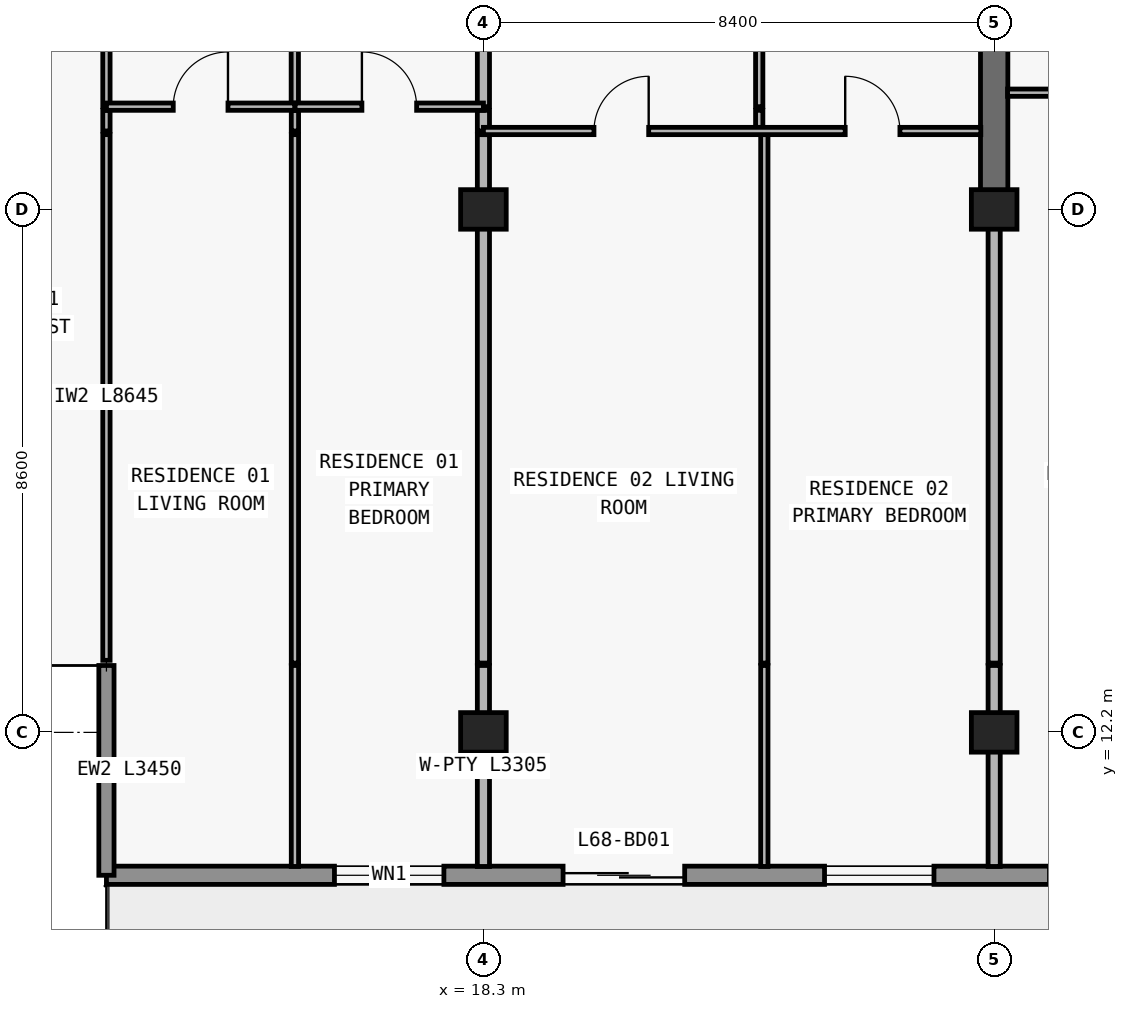
"""IFC4 building model, lengths in metres.
Left out: names, types, materials, properties, quantities, classifications, styles, units other than length and angle.
Written with IfcOpenShell. Run it as: python <this file> out.ifc"""

import sys

from ifc_helpers import new_model, si_unit, direction, frame, frame_2d, origin, origin_2d, place, context, subcontext, project, spatial, rectangle, extrude, element, fill, save


model = new_model("IFC4")
c1 = context("Model", 3, precision=1e-05, world=origin(), true_north=direction((0.0, 1.0)))
c2 = subcontext(c1, "Body", "Model", "MODEL_VIEW")
j1 = project(units=[si_unit("LENGTHUNIT", "METRE"), si_unit("PLANEANGLEUNIT", "RADIAN")], contexts=[c1])
p1 = place(None, origin())
s1 = spatial("IfcSite", under=j1, at=p1, CompositionType="ELEMENT")
p2 = place(p1, origin())
s2 = spatial("IfcBuilding", under=s1, at=p2, CompositionType="ELEMENT")
p3 = place(p2, frame((0.0, 0.0, 243.0)))
s3 = spatial("IfcBuildingStorey", under=s2, at=p3, CompositionType="ELEMENT", Elevation=243.0)
for number, where, z_axis, x_axis in (
    (1, (18.3, 12.2, 0.0), (0.0, 0.0, 1.0), (1.0, 0.0, 0.0)),
    (2, (26.7, 12.2, 0.0), (0.0, 0.0, 1.0), (1.0, 0.0, 0.0)),
    (3, (18.3, 20.8, 0.0), (0.0, 0.0, 1.0), (1.0, 0.0, 0.0)),
    (4, (26.7, 20.8, 0.0), (0.0, 0.0, 1.0), (1.0, 0.0, 0.0)),
):
    element("IfcColumn", number, at=place(p3, frame(where, z_axis=z_axis, x_axis=x_axis)), inside=s3, PredefinedType="COLUMN", context=c2, shape_type="SweptSolid", body=[
        extrude(rectangle(XDim=0.75, YDim=0.65, at=origin_2d()), origin(), (0.0, 0.0, 1.0), 3.05),
    ])
p4 = place(p3, frame((26.7, 20.8, 0.0), z_axis=(0.0, 0.0, 1.0), x_axis=(0.0, 1.0, 0.0)))
e5 = element("IfcWall", 5, at=p4, inside=s3, PredefinedType="SHEAR", context=c2, shape_type="SweptSolid", body=[
    extrude(rectangle(XDim=8.6, YDim=0.45, at=frame_2d((4.3, 0.0))), origin(), (0.0, 0.0, 1.0), 3.05),
])
p5 = place(p3, frame((65.7, 9.85, 0.0), z_axis=(0.0, 0.0, 1.0), x_axis=(-1.0, 0.0, 0.0)))
e6 = element("IfcWall", 6, at=p5, inside=s3, PredefinedType="STANDARD", context=c2, shape_type="SweptSolid", body=[
    extrude(rectangle(XDim=53.6, YDim=0.3, at=frame_2d((26.8, 0.0))), origin(), (0.0, 0.0, 1.0), 3.05),
])
p6 = place(p5, frame((48.05, 0.0, 0.85)))
e7 = element("IfcOpeningElement", 7, at=p6, cuts=e6, PredefinedType="OPENING", context=c2, shape_type="SweptSolid", body=[
    extrude(rectangle(XDim=1.8, YDim=1.55, at=frame_2d((0.9, 0.775))), frame((0.0, 0.16, 0.0), z_axis=(0.0, -1.0, 0.0), x_axis=(1.0, 0.0, 0.0)), (0.0, 0.0, 1.0), 0.32),
])
p7 = place(p5, frame((44.09, 0.0, 0.0)))
e8 = element("IfcOpeningElement", 8, at=p7, cuts=e6, PredefinedType="OPENING", context=c2, shape_type="SweptSolid", body=[
    extrude(rectangle(XDim=2.0, YDim=2.3, at=frame_2d((1.0, 1.15))), frame((0.0, 0.16, 0.0), z_axis=(0.0, -1.0, 0.0), x_axis=(1.0, 0.0, 0.0)), (0.0, 0.0, 1.0), 0.32),
])
p8 = place(p5, frame((39.99, 0.0, 0.85)))
e9 = element("IfcOpeningElement", 9, at=p8, cuts=e6, PredefinedType="OPENING", context=c2, shape_type="SweptSolid", body=[
    extrude(rectangle(XDim=1.8, YDim=1.55, at=frame_2d((0.9, 0.775))), frame((0.0, 0.16, 0.0), z_axis=(0.0, -1.0, 0.0), x_axis=(1.0, 0.0, 0.0)), (0.0, 0.0, 1.0), 0.32),
])
p9 = place(p5, frame((36.09, 0.0, 0.0)))
e10 = element("IfcOpeningElement", 10, at=p9, cuts=e6, PredefinedType="OPENING", context=c2, shape_type="SweptSolid", body=[
    extrude(rectangle(XDim=2.0, YDim=2.3, at=frame_2d((1.0, 1.15))), frame((0.0, 0.16, 0.0), z_axis=(0.0, -1.0, 0.0), x_axis=(1.0, 0.0, 0.0)), (0.0, 0.0, 1.0), 0.32),
])
p10 = place(p5, frame((31.41, 0.0, 0.65)))
e11 = element("IfcOpeningElement", 11, at=p10, cuts=e6, PredefinedType="OPENING", context=c2, shape_type="SweptSolid", body=[
    extrude(rectangle(XDim=2.6, YDim=1.85, at=frame_2d((1.3, 0.925))), frame((0.0, 0.16, 0.0), z_axis=(0.0, -1.0, 0.0), x_axis=(1.0, 0.0, 0.0)), (0.0, 0.0, 1.0), 0.32),
])
p11 = place(p5, frame((25.7, 0.0, 0.85)))
e12 = element("IfcOpeningElement", 12, at=p11, cuts=e6, PredefinedType="OPENING", context=c2, shape_type="SweptSolid", body=[
    extrude(rectangle(XDim=2.2, YDim=1.55, at=frame_2d((1.1, 0.775))), frame((0.0, 0.16, 0.0), z_axis=(0.0, -1.0, 0.0), x_axis=(1.0, 0.0, 0.0)), (0.0, 0.0, 1.0), 0.32),
])
p12 = place(p5, frame((17.7, 0.0, 0.85)))
e13 = element("IfcOpeningElement", 13, at=p12, cuts=e6, PredefinedType="OPENING", context=c2, shape_type="SweptSolid", body=[
    extrude(rectangle(XDim=2.2, YDim=1.55, at=frame_2d((1.1, 0.775))), frame((0.0, 0.16, 0.0), z_axis=(0.0, -1.0, 0.0), x_axis=(1.0, 0.0, 0.0)), (0.0, 0.0, 1.0), 0.32),
])
p13 = place(p5, frame((11.29, 0.0, 0.0)))
e14 = element("IfcOpeningElement", 14, at=p13, cuts=e6, PredefinedType="OPENING", context=c2, shape_type="SweptSolid", body=[
    extrude(rectangle(XDim=2.0, YDim=2.3, at=frame_2d((1.0, 1.15))), frame((0.0, 0.16, 0.0), z_axis=(0.0, -1.0, 0.0), x_axis=(1.0, 0.0, 0.0)), (0.0, 0.0, 1.0), 0.32),
])
p14 = place(p5, frame((7.19, 0.0, 0.85)))
e15 = element("IfcOpeningElement", 15, at=p14, cuts=e6, PredefinedType="OPENING", context=c2, shape_type="SweptSolid", body=[
    extrude(rectangle(XDim=1.8, YDim=1.55, at=frame_2d((0.9, 0.775))), frame((0.0, 0.16, 0.0), z_axis=(0.0, -1.0, 0.0), x_axis=(1.0, 0.0, 0.0)), (0.0, 0.0, 1.0), 0.32),
])
p15 = place(p5, frame((0.65, 0.0, 0.85)))
e16 = element("IfcOpeningElement", 16, at=p15, cuts=e6, PredefinedType="OPENING", context=c2, shape_type="SweptSolid", body=[
    extrude(rectangle(XDim=1.8, YDim=1.55, at=frame_2d((0.9, 0.775))), frame((0.0, 0.16, 0.0), z_axis=(0.0, -1.0, 0.0), x_axis=(1.0, 0.0, 0.0)), (0.0, 0.0, 1.0), 0.32),
])
p16 = place(p3, frame((12.1, 13.3, 0.0), z_axis=(0.0, 0.0, 1.0), x_axis=(0.0, -1.0, 0.0)))
e17 = element("IfcWall", 17, at=p16, inside=s3, PredefinedType="ELEMENTEDWALL", context=c2, shape_type="SweptSolid", body=[
    extrude(rectangle(XDim=3.45, YDim=0.25, at=frame_2d((1.725, 0.0))), origin(), (0.0, 0.0, 1.0), 3.05),
])
p17 = place(p3, frame((12.1, 13.385, 0.0), z_axis=(0.0, 0.0, 1.0), x_axis=(0.0, 1.0, 0.0)))
e18 = element("IfcWall", 18, at=p17, inside=s3, PredefinedType="PARTITIONING", context=c2, shape_type="SweptSolid", body=[
    extrude(rectangle(XDim=8.645, YDim=0.12, at=frame_2d((4.323, 0.0))), origin(), (0.0, 0.0, 1.0), 3.05),
])
p18 = place(p3, frame((12.1, 22.09, 0.0), z_axis=(0.0, 0.0, 1.0), x_axis=(0.0, 1.0, 0.0)))
e19 = element("IfcWall", 19, at=p18, inside=s3, PredefinedType="PARTITIONING", context=c2, shape_type="SweptSolid", body=[
    extrude(rectangle(XDim=0.34, YDim=0.12, at=frame_2d((0.17, 0.0))), origin(), (0.0, 0.0, 1.0), 3.05),
])
p19 = place(p3, frame((12.1, 22.49, 0.0), z_axis=(0.0, 0.0, 1.0), x_axis=(0.0, 1.0, 0.0)))
e20 = element("IfcWall", 20, at=p19, inside=s3, PredefinedType="PARTITIONING", context=c2, shape_type="SweptSolid", body=[
    extrude(rectangle(XDim=4.69, YDim=0.12, at=frame_2d((2.345, 0.0))), origin(), (0.0, 0.0, 1.0), 3.05),
])
p20 = place(p19, frame((1.895, 0.0, 0.0)))
e21 = element("IfcOpeningElement", 21, at=p20, cuts=e20, PredefinedType="OPENING", context=c2, shape_type="SweptSolid", body=[
    extrude(rectangle(XDim=0.9, YDim=2.15, at=frame_2d((0.45, 1.075))), frame((0.0, 0.07, 0.0), z_axis=(0.0, -1.0, 0.0), x_axis=(1.0, 0.0, 0.0)), (0.0, 0.0, 1.0), 0.14),
])
p21 = place(p3, frame((15.198, 22.49, 0.0), z_axis=(0.0, 0.0, 1.0), x_axis=(0.0, 1.0, 0.0)))
e22 = element("IfcWall", 22, at=p21, inside=s3, PredefinedType="PARTITIONING", context=c2, shape_type="SweptSolid", body=[
    extrude(rectangle(XDim=4.69, YDim=0.12, at=frame_2d((2.345, 0.0))), origin(), (0.0, 0.0, 1.0), 3.05),
])
p22 = place(p21, frame((1.895, 0.0, 0.0)))
e23 = element("IfcOpeningElement", 23, at=p22, cuts=e22, PredefinedType="OPENING", context=c2, shape_type="SweptSolid", body=[
    extrude(rectangle(XDim=0.9, YDim=2.15, at=frame_2d((0.45, 1.075))), frame((0.0, 0.07, 0.0), z_axis=(0.0, -1.0, 0.0), x_axis=(1.0, 0.0, 0.0)), (0.0, 0.0, 1.0), 0.14),
])
p23 = place(p3, frame((15.2, 9.995, 0.0), z_axis=(0.0, 0.0, 1.0), x_axis=(0.0, 1.0, 0.0)))
e24 = element("IfcWall", 24, at=p23, inside=s3, PredefinedType="PARTITIONING", context=c2, shape_type="SweptSolid", body=[
    extrude(rectangle(XDim=3.305, YDim=0.12, at=frame_2d((1.652, 0.0))), origin(), (0.0, 0.0, 1.0), 3.05),
])
p24 = place(p3, frame((15.2, 13.34, 0.0), z_axis=(0.0, 0.0, 1.0), x_axis=(0.0, 1.0, 0.0)))
e25 = element("IfcWall", 25, at=p24, inside=s3, PredefinedType="PARTITIONING", context=c2, shape_type="SweptSolid", body=[
    extrude(rectangle(XDim=8.69, YDim=0.12, at=frame_2d((4.345, 0.0))), origin(), (0.0, 0.0, 1.0), 3.05),
])
p25 = place(p3, frame((15.2, 22.09, 0.0), z_axis=(0.0, 0.0, 1.0), x_axis=(0.0, 1.0, 0.0)))
e26 = element("IfcWall", 26, at=p25, inside=s3, PredefinedType="PARTITIONING", context=c2, shape_type="SweptSolid", body=[
    extrude(rectangle(XDim=0.34, YDim=0.12, at=frame_2d((0.17, 0.0))), origin(), (0.0, 0.0, 1.0), 3.05),
])
p26 = place(p3, frame((18.3, 9.995, 0.0), z_axis=(0.0, 0.0, 1.0), x_axis=(0.0, 1.0, 0.0)))
e27 = element("IfcWall", 27, at=p26, inside=s3, PredefinedType="PARTITIONING", context=c2, shape_type="SweptSolid", body=[
    extrude(rectangle(XDim=3.305, YDim=0.2, at=frame_2d((1.652, 0.0))), origin(), (0.0, 0.0, 1.0), 2.263),
])
p27 = place(p3, frame((18.3, 13.34, 0.0), z_axis=(0.0, 0.0, 1.0), x_axis=(0.0, 1.0, 0.0)))
e28 = element("IfcWall", 28, at=p27, inside=s3, PredefinedType="PARTITIONING", context=c2, shape_type="SweptSolid", body=[
    extrude(rectangle(XDim=8.69, YDim=0.2, at=frame_2d((4.345, 0.0))), origin(), (0.0, 0.0, 1.0), 2.263),
])
p28 = place(p3, frame((18.3, 22.09, 0.0), z_axis=(0.0, 0.0, 1.0), x_axis=(0.0, 1.0, 0.0)))
e29 = element("IfcWall", 29, at=p28, inside=s3, PredefinedType="PARTITIONING", context=c2, shape_type="SweptSolid", body=[
    extrude(rectangle(XDim=0.34, YDim=0.2, at=frame_2d((0.17, 0.0))), origin(), (0.0, 0.0, 1.0), 2.263),
])
p29 = place(p3, frame((18.3, 22.49, 0.0), z_axis=(0.0, 0.0, 1.0), x_axis=(0.0, 1.0, 0.0)))
e30 = element("IfcWall", 30, at=p29, inside=s3, PredefinedType="PARTITIONING", context=c2, shape_type="SweptSolid", body=[
    extrude(rectangle(XDim=4.69, YDim=0.2, at=frame_2d((2.345, 0.0))), origin(), (0.0, 0.0, 1.0), 2.263),
])
p30 = place(p3, frame((22.836, 22.09, 0.0), z_axis=(0.0, 0.0, 1.0), x_axis=(0.0, 1.0, 0.0)))
e31 = element("IfcWall", 31, at=p30, inside=s3, PredefinedType="PARTITIONING", context=c2, shape_type="SweptSolid", body=[
    extrude(rectangle(XDim=0.34, YDim=0.12, at=frame_2d((0.17, 0.0))), origin(), (0.0, 0.0, 1.0), 3.05),
])
p31 = place(p3, frame((22.836, 22.49, 0.0), z_axis=(0.0, 0.0, 1.0), x_axis=(0.0, 1.0, 0.0)))
e32 = element("IfcWall", 32, at=p31, inside=s3, PredefinedType="PARTITIONING", context=c2, shape_type="SweptSolid", body=[
    extrude(rectangle(XDim=4.69, YDim=0.12, at=frame_2d((2.345, 0.0))), origin(), (0.0, 0.0, 1.0), 3.05),
])
p32 = place(p31, frame((1.895, 0.0, 0.0)))
e33 = element("IfcOpeningElement", 33, at=p32, cuts=e32, PredefinedType="OPENING", context=c2, shape_type="SweptSolid", body=[
    extrude(rectangle(XDim=0.9, YDim=2.15, at=frame_2d((0.45, 1.075))), frame((0.0, 0.07, 0.0), z_axis=(0.0, -1.0, 0.0), x_axis=(1.0, 0.0, 0.0)), (0.0, 0.0, 1.0), 0.14),
])
p33 = place(p3, frame((22.92, 9.995, 0.0), z_axis=(0.0, 0.0, 1.0), x_axis=(0.0, 1.0, 0.0)))
e34 = element("IfcWall", 34, at=p33, inside=s3, PredefinedType="PARTITIONING", context=c2, shape_type="SweptSolid", body=[
    extrude(rectangle(XDim=3.305, YDim=0.12, at=frame_2d((1.652, 0.0))), origin(), (0.0, 0.0, 1.0), 3.05),
])
p34 = place(p3, frame((22.92, 13.34, 0.0), z_axis=(0.0, 0.0, 1.0), x_axis=(0.0, 1.0, 0.0)))
e35 = element("IfcWall", 35, at=p34, inside=s3, PredefinedType="PARTITIONING", context=c2, shape_type="SweptSolid", body=[
    extrude(rectangle(XDim=8.69, YDim=0.12, at=frame_2d((4.345, 0.0))), origin(), (0.0, 0.0, 1.0), 3.05),
])
p35 = place(p3, frame((26.7, 9.995, 0.0), z_axis=(0.0, 0.0, 1.0), x_axis=(0.0, 1.0, 0.0)))
e36 = element("IfcWall", 36, at=p35, inside=s3, PredefinedType="PARTITIONING", context=c2, shape_type="SweptSolid", body=[
    extrude(rectangle(XDim=3.305, YDim=0.2, at=frame_2d((1.652, 0.0))), origin(), (0.0, 0.0, 1.0), 2.263),
])
p36 = place(p3, frame((26.7, 13.34, 0.0), z_axis=(0.0, 0.0, 1.0), x_axis=(0.0, 1.0, 0.0)))
e37 = element("IfcWall", 37, at=p36, inside=s3, PredefinedType="PARTITIONING", context=c2, shape_type="SweptSolid", body=[
    extrude(rectangle(XDim=7.455, YDim=0.2, at=frame_2d((3.728, 0.0))), origin(), (0.0, 0.0, 1.0), 2.263),
])
p37 = place(p3, frame((18.3, 22.09, 0.0), z_axis=(0.0, 0.0, 1.0), x_axis=(1.0, 0.0, 0.0)))
e38 = element("IfcWall", 38, at=p37, inside=s3, PredefinedType="PARTITIONING", context=c2, shape_type="SweptSolid", body=[
    extrude(rectangle(XDim=8.18, YDim=0.12, at=frame_2d((4.09, 0.0))), origin(), (0.0, 0.0, 1.0), 3.05),
])
p38 = place(p37, frame((1.818, 0.0, 0.0)))
e39 = element("IfcOpeningElement", 39, at=p38, cuts=e38, PredefinedType="OPENING", context=c2, shape_type="SweptSolid", body=[
    extrude(rectangle(XDim=0.9, YDim=2.15, at=frame_2d((0.45, 1.075))), frame((0.0, 0.07, 0.0), z_axis=(0.0, -1.0, 0.0), x_axis=(1.0, 0.0, 0.0)), (0.0, 0.0, 1.0), 0.14),
])
p39 = place(p37, frame((5.95, 0.0, 0.0)))
e40 = element("IfcOpeningElement", 40, at=p39, cuts=e38, PredefinedType="OPENING", context=c2, shape_type="SweptSolid", body=[
    extrude(rectangle(XDim=0.9, YDim=2.15, at=frame_2d((0.45, 1.075))), frame((0.0, 0.07, 0.0), z_axis=(0.0, -1.0, 0.0), x_axis=(1.0, 0.0, 0.0)), (0.0, 0.0, 1.0), 0.14),
])
p40 = place(p3, frame((12.1, 22.49, 0.0), z_axis=(0.0, 0.0, 1.0), x_axis=(1.0, 0.0, 0.0)))
e41 = element("IfcWall", 41, at=p40, inside=s3, PredefinedType="PARTITIONING", context=c2, shape_type="SweptSolid", body=[
    extrude(rectangle(XDim=3.098, YDim=0.12, at=frame_2d((1.549, 0.0))), origin(), (0.0, 0.0, 1.0), 3.05),
])
p41 = place(p40, frame((1.099, 0.0, 0.0)))
e42 = element("IfcOpeningElement", 42, at=p41, cuts=e41, PredefinedType="OPENING", context=c2, shape_type="SweptSolid", body=[
    extrude(rectangle(XDim=0.9, YDim=2.15, at=frame_2d((0.45, 1.075))), frame((0.0, 0.07, 0.0), z_axis=(0.0, -1.0, 0.0), x_axis=(1.0, 0.0, 0.0)), (0.0, 0.0, 1.0), 0.14),
])
p42 = place(p3, frame((15.203, 22.49, 0.0), z_axis=(0.0, 0.0, 1.0), x_axis=(1.0, 0.0, 0.0)))
e43 = element("IfcWall", 43, at=p42, inside=s3, PredefinedType="PARTITIONING", context=c2, shape_type="SweptSolid", body=[
    extrude(rectangle(XDim=3.097, YDim=0.12, at=frame_2d((1.549, 0.0))), origin(), (0.0, 0.0, 1.0), 3.05),
])
p43 = place(p42, frame((1.098, 0.0, 0.0)))
e44 = element("IfcOpeningElement", 44, at=p43, cuts=e43, PredefinedType="OPENING", context=c2, shape_type="SweptSolid", body=[
    extrude(rectangle(XDim=0.9, YDim=2.15, at=frame_2d((0.45, 1.075))), frame((0.0, 0.07, 0.0), z_axis=(0.0, -1.0, 0.0), x_axis=(1.0, 0.0, 0.0)), (0.0, 0.0, 1.0), 0.14),
])
p44 = place(p3, frame((26.92, 22.72, 0.0), z_axis=(0.0, 0.0, 1.0), x_axis=(1.0, 0.0, 0.0)))
e45 = element("IfcWall", 45, at=p44, inside=s3, PredefinedType="PARTITIONING", context=c2, shape_type="SweptSolid", body=[
    extrude(rectangle(XDim=8.18, YDim=0.12, at=frame_2d((4.09, 0.0))), origin(), (0.0, 0.0, 1.0), 3.05),
])
p45 = place(p44, frame((1.33, 0.0, 0.0)))
e46 = element("IfcOpeningElement", 46, at=p45, cuts=e45, PredefinedType="OPENING", context=c2, shape_type="SweptSolid", body=[
    extrude(rectangle(XDim=0.9, YDim=2.15, at=frame_2d((0.45, 1.075))), frame((0.0, 0.07, 0.0), z_axis=(0.0, -1.0, 0.0), x_axis=(1.0, 0.0, 0.0)), (0.0, 0.0, 1.0), 0.14),
])
p46 = place(p6, origin())
e47 = element("IfcWindow", 47, at=p46, inside=s3, PartitioningType="SINGLE_PANEL", PredefinedType="WINDOW", context=c2, shape_type="SweptSolid", body=[
    extrude(rectangle(XDim=1.8, YDim=1.55, at=frame_2d((0.9, 0.775))), frame((0.0, 0.03, 0.0), z_axis=(0.0, -1.0, 0.0), x_axis=(1.0, 0.0, 0.0)), (0.0, 0.0, 1.0), 0.06),
])
fill(e7, e47)
p47 = place(p7, origin())
e48 = element("IfcDoor", 48, at=p47, inside=s3, OperationType="DOUBLE_DOOR_SLIDING", PredefinedType="DOOR", context=c2, shape_type="SweptSolid", body=[
    extrude(rectangle(XDim=2.0, YDim=2.3, at=frame_2d((1.0, 1.15))), frame((0.0, 0.025, 0.0), z_axis=(0.0, -1.0, 0.0), x_axis=(1.0, 0.0, 0.0)), (0.0, 0.0, 1.0), 0.05),
])
fill(e8, e48)
p48 = place(p8, origin())
e49 = element("IfcWindow", 49, at=p48, inside=s3, PartitioningType="SINGLE_PANEL", PredefinedType="WINDOW", context=c2, shape_type="SweptSolid", body=[
    extrude(rectangle(XDim=1.8, YDim=1.55, at=frame_2d((0.9, 0.775))), frame((0.0, 0.03, 0.0), z_axis=(0.0, -1.0, 0.0), x_axis=(1.0, 0.0, 0.0)), (0.0, 0.0, 1.0), 0.06),
])
fill(e9, e49)
p49 = place(p41, origin())
e50 = element("IfcDoor", 50, at=p49, inside=s3, OperationType="SINGLE_SWING_RIGHT", PredefinedType="DOOR", context=c2, shape_type="SweptSolid", body=[
    extrude(rectangle(XDim=0.9, YDim=2.15, at=frame_2d((0.45, 1.075))), frame((0.0, 0.025, 0.0), z_axis=(0.0, -1.0, 0.0), x_axis=(1.0, 0.0, 0.0)), (0.0, 0.0, 1.0), 0.05),
])
fill(e42, e50)
p50 = place(p43, origin())
e51 = element("IfcDoor", 51, at=p50, inside=s3, OperationType="SINGLE_SWING_LEFT", PredefinedType="DOOR", context=c2, shape_type="SweptSolid", body=[
    extrude(rectangle(XDim=0.9, YDim=2.15, at=frame_2d((0.45, 1.075))), frame((0.0, 0.025, 0.0), z_axis=(0.0, -1.0, 0.0), x_axis=(1.0, 0.0, 0.0)), (0.0, 0.0, 1.0), 0.05),
])
fill(e44, e51)
p51 = place(p38, origin())
e52 = element("IfcDoor", 52, at=p51, inside=s3, OperationType="SINGLE_SWING_RIGHT", PredefinedType="DOOR", context=c2, shape_type="SweptSolid", body=[
    extrude(rectangle(XDim=0.9, YDim=2.15, at=frame_2d((0.45, 1.075))), frame((0.0, 0.025, 0.0), z_axis=(0.0, -1.0, 0.0), x_axis=(1.0, 0.0, 0.0)), (0.0, 0.0, 1.0), 0.05),
])
fill(e39, e52)
p52 = place(p39, origin())
e53 = element("IfcDoor", 53, at=p52, inside=s3, OperationType="SINGLE_SWING_LEFT", PredefinedType="DOOR", context=c2, shape_type="SweptSolid", body=[
    extrude(rectangle(XDim=0.9, YDim=2.15, at=frame_2d((0.45, 1.075))), frame((0.0, 0.025, 0.0), z_axis=(0.0, -1.0, 0.0), x_axis=(1.0, 0.0, 0.0)), (0.0, 0.0, 1.0), 0.05),
])
fill(e40, e53)
save(model, sys.argv[1])
